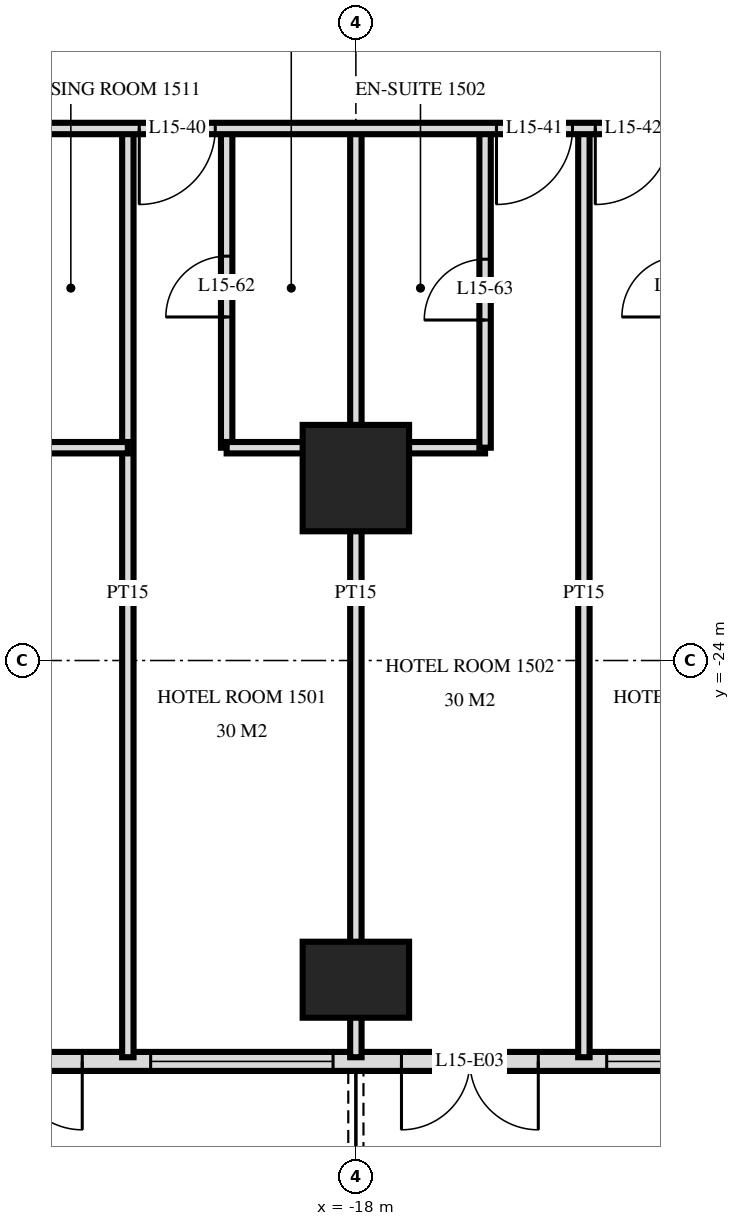
"""IFC4 building model, lengths in metres.
Left out: names, types, materials, properties, quantities, classifications, styles, units other than length and angle.
Written with IfcOpenShell. Run it as: python <this file> out.ifc"""

import sys

from ifc_helpers import new_model, si_unit, direction, frame, frame_2d, origin, origin_2d, place, context, subcontext, project, spatial, rectangle, extrude, element, fill, save


model = new_model("IFC4")
c1 = context("Model", 3, precision=1e-05, world=origin(), true_north=direction((0.0, 1.0)))
c2 = subcontext(c1, "Body", "Model", "MODEL_VIEW")
j1 = project(units=[si_unit("LENGTHUNIT", "METRE"), si_unit("PLANEANGLEUNIT", "RADIAN")], contexts=[c1])
p1 = place(None, origin())
s1 = spatial("IfcSite", under=j1, at=p1, CompositionType="ELEMENT")
p2 = place(p1, origin())
s2 = spatial("IfcBuilding", under=s1, at=p2, CompositionType="ELEMENT")
p3 = place(p2, frame((0.0, 0.0, 63.6)))
s3 = spatial("IfcBuildingStorey", under=s2, at=p3, CompositionType="ELEMENT", Elevation=63.6)
p4 = place(p3, frame((-18.0, -28.2, 0.0), z_axis=(0.0, 0.0, 1.0), x_axis=(1.0, 0.0, 0.0)))
e1 = element("IfcColumn", 1, at=p4, inside=s3, PredefinedType="COLUMN", context=c2, shape_type="SweptSolid", body=[
    extrude(rectangle(XDim=1.4, YDim=1.0, at=origin_2d()), origin(), (0.0, 0.0, 1.0), 3.6),
])
p5 = place(p3, frame((-18.0, -21.6, 0.0), z_axis=(0.0, 0.0, 1.0), x_axis=(1.0, 0.0, 0.0)))
e2 = element("IfcColumn", 2, at=p5, inside=s3, PredefinedType="COLUMN", context=c2, shape_type="SweptSolid", body=[
    extrude(rectangle(XDim=1.4, YDim=1.4, at=origin_2d()), origin(), (0.0, 0.0, 1.0), 3.6),
])
p6 = place(p3, frame((-28.775, -29.275, 0.0), z_axis=(0.0, 0.0, 1.0), x_axis=(1.0, 0.0, 0.0)))
e3 = element("IfcWall", 3, at=p6, inside=s3, PredefinedType="SOLIDWALL", context=c2, shape_type="SweptSolid", body=[
    extrude(rectangle(XDim=57.551, YDim=0.25, at=frame_2d((28.775, 0.0))), origin(), (0.0, 0.0, 1.0), 3.32),
])
p7 = place(p6, frame((0.575, 0.0, 0.0)))
e4 = element("IfcOpeningElement", 4, at=p7, cuts=e3, PredefinedType="OPENING", context=c2, shape_type="SweptSolid", body=[
    extrude(rectangle(XDim=1.8, YDim=2.4, at=frame_2d((0.9, 1.2))), frame((0.0, 0.135, 0.0), z_axis=(0.0, -1.0, 0.0), x_axis=(1.0, 0.0, 0.0)), (0.0, 0.0, 1.0), 0.27),
])
p8 = place(p6, frame((5.375, 0.0, 0.0)))
e5 = element("IfcOpeningElement", 5, at=p8, cuts=e3, PredefinedType="OPENING", context=c2, shape_type="SweptSolid", body=[
    extrude(rectangle(XDim=1.8, YDim=2.4, at=frame_2d((0.9, 1.2))), frame((0.0, 0.135, 0.0), z_axis=(0.0, -1.0, 0.0), x_axis=(1.0, 0.0, 0.0)), (0.0, 0.0, 1.0), 0.27),
])
p9 = place(p6, frame((8.075, 0.0, 0.3)))
e6 = element("IfcOpeningElement", 6, at=p9, cuts=e3, PredefinedType="OPENING", context=c2, shape_type="SweptSolid", body=[
    extrude(rectangle(XDim=2.4, YDim=2.1, at=frame_2d((1.2, 1.05))), frame((0.0, 0.135, 0.0), z_axis=(0.0, -1.0, 0.0), x_axis=(1.0, 0.0, 0.0)), (0.0, 0.0, 1.0), 0.27),
])
p10 = place(p6, frame((11.375, 0.0, 0.0)))
e7 = element("IfcOpeningElement", 7, at=p10, cuts=e3, PredefinedType="OPENING", context=c2, shape_type="SweptSolid", body=[
    extrude(rectangle(XDim=1.8, YDim=2.4, at=frame_2d((0.9, 1.2))), frame((0.0, 0.135, 0.0), z_axis=(0.0, -1.0, 0.0), x_axis=(1.0, 0.0, 0.0)), (0.0, 0.0, 1.0), 0.27),
])
p11 = place(p6, frame((14.075, 0.0, 0.3)))
e8 = element("IfcOpeningElement", 8, at=p11, cuts=e3, PredefinedType="OPENING", context=c2, shape_type="SweptSolid", body=[
    extrude(rectangle(XDim=2.4, YDim=2.1, at=frame_2d((1.2, 1.05))), frame((0.0, 0.135, 0.0), z_axis=(0.0, -1.0, 0.0), x_axis=(1.0, 0.0, 0.0)), (0.0, 0.0, 1.0), 0.27),
])
p12 = place(p6, frame((17.375, 0.0, 0.0)))
e9 = element("IfcOpeningElement", 9, at=p12, cuts=e3, PredefinedType="OPENING", context=c2, shape_type="SweptSolid", body=[
    extrude(rectangle(XDim=1.8, YDim=2.4, at=frame_2d((0.9, 1.2))), frame((0.0, 0.135, 0.0), z_axis=(0.0, -1.0, 0.0), x_axis=(1.0, 0.0, 0.0)), (0.0, 0.0, 1.0), 0.27),
])
p13 = place(p6, frame((20.075, 0.0, 0.3)))
e10 = element("IfcOpeningElement", 10, at=p13, cuts=e3, PredefinedType="OPENING", context=c2, shape_type="SweptSolid", body=[
    extrude(rectangle(XDim=2.4, YDim=2.1, at=frame_2d((1.2, 1.05))), frame((0.0, 0.135, 0.0), z_axis=(0.0, -1.0, 0.0), x_axis=(1.0, 0.0, 0.0)), (0.0, 0.0, 1.0), 0.27),
])
p14 = place(p6, frame((23.075, 0.0, 0.3)))
e11 = element("IfcOpeningElement", 11, at=p14, cuts=e3, PredefinedType="OPENING", context=c2, shape_type="SweptSolid", body=[
    extrude(rectangle(XDim=2.4, YDim=2.1, at=frame_2d((1.2, 1.05))), frame((0.0, 0.135, 0.0), z_axis=(0.0, -1.0, 0.0), x_axis=(1.0, 0.0, 0.0)), (0.0, 0.0, 1.0), 0.27),
])
p15 = place(p6, frame((26.375, 0.0, 0.0)))
e12 = element("IfcOpeningElement", 12, at=p15, cuts=e3, PredefinedType="OPENING", context=c2, shape_type="SweptSolid", body=[
    extrude(rectangle(XDim=1.8, YDim=2.4, at=frame_2d((0.9, 1.2))), frame((0.0, 0.135, 0.0), z_axis=(0.0, -1.0, 0.0), x_axis=(1.0, 0.0, 0.0)), (0.0, 0.0, 1.0), 0.27),
])
p16 = place(p6, frame((29.075, 0.0, 0.3)))
e13 = element("IfcOpeningElement", 13, at=p16, cuts=e3, PredefinedType="OPENING", context=c2, shape_type="SweptSolid", body=[
    extrude(rectangle(XDim=2.4, YDim=2.1, at=frame_2d((1.2, 1.05))), frame((0.0, 0.135, 0.0), z_axis=(0.0, -1.0, 0.0), x_axis=(1.0, 0.0, 0.0)), (0.0, 0.0, 1.0), 0.27),
])
p17 = place(p6, frame((32.375, 0.0, 0.0)))
e14 = element("IfcOpeningElement", 14, at=p17, cuts=e3, PredefinedType="OPENING", context=c2, shape_type="SweptSolid", body=[
    extrude(rectangle(XDim=1.8, YDim=2.4, at=frame_2d((0.9, 1.2))), frame((0.0, 0.135, 0.0), z_axis=(0.0, -1.0, 0.0), x_axis=(1.0, 0.0, 0.0)), (0.0, 0.0, 1.0), 0.27),
])
p18 = place(p6, frame((35.375, 0.0, 0.0)))
e15 = element("IfcOpeningElement", 15, at=p18, cuts=e3, PredefinedType="OPENING", context=c2, shape_type="SweptSolid", body=[
    extrude(rectangle(XDim=1.8, YDim=2.4, at=frame_2d((0.9, 1.2))), frame((0.0, 0.135, 0.0), z_axis=(0.0, -1.0, 0.0), x_axis=(1.0, 0.0, 0.0)), (0.0, 0.0, 1.0), 0.27),
])
p19 = place(p6, frame((38.075, 0.0, 0.3)))
e16 = element("IfcOpeningElement", 16, at=p19, cuts=e3, PredefinedType="OPENING", context=c2, shape_type="SweptSolid", body=[
    extrude(rectangle(XDim=2.4, YDim=2.1, at=frame_2d((1.2, 1.05))), frame((0.0, 0.135, 0.0), z_axis=(0.0, -1.0, 0.0), x_axis=(1.0, 0.0, 0.0)), (0.0, 0.0, 1.0), 0.27),
])
p20 = place(p6, frame((41.375, 0.0, 0.0)))
e17 = element("IfcOpeningElement", 17, at=p20, cuts=e3, PredefinedType="OPENING", context=c2, shape_type="SweptSolid", body=[
    extrude(rectangle(XDim=1.8, YDim=2.4, at=frame_2d((0.9, 1.2))), frame((0.0, 0.135, 0.0), z_axis=(0.0, -1.0, 0.0), x_axis=(1.0, 0.0, 0.0)), (0.0, 0.0, 1.0), 0.27),
])
p21 = place(p6, frame((44.075, 0.0, 0.3)))
e18 = element("IfcOpeningElement", 18, at=p21, cuts=e3, PredefinedType="OPENING", context=c2, shape_type="SweptSolid", body=[
    extrude(rectangle(XDim=2.4, YDim=2.1, at=frame_2d((1.2, 1.05))), frame((0.0, 0.135, 0.0), z_axis=(0.0, -1.0, 0.0), x_axis=(1.0, 0.0, 0.0)), (0.0, 0.0, 1.0), 0.27),
])
p22 = place(p6, frame((47.075, 0.0, 0.3)))
e19 = element("IfcOpeningElement", 19, at=p22, cuts=e3, PredefinedType="OPENING", context=c2, shape_type="SweptSolid", body=[
    extrude(rectangle(XDim=2.4, YDim=2.1, at=frame_2d((1.2, 1.05))), frame((0.0, 0.135, 0.0), z_axis=(0.0, -1.0, 0.0), x_axis=(1.0, 0.0, 0.0)), (0.0, 0.0, 1.0), 0.27),
])
p23 = place(p6, frame((50.375, 0.0, 0.0)))
e20 = element("IfcOpeningElement", 20, at=p23, cuts=e3, PredefinedType="OPENING", context=c2, shape_type="SweptSolid", body=[
    extrude(rectangle(XDim=1.8, YDim=2.4, at=frame_2d((0.9, 1.2))), frame((0.0, 0.135, 0.0), z_axis=(0.0, -1.0, 0.0), x_axis=(1.0, 0.0, 0.0)), (0.0, 0.0, 1.0), 0.27),
])
p24 = place(p6, frame((53.375, 0.0, 0.0)))
e21 = element("IfcOpeningElement", 21, at=p24, cuts=e3, PredefinedType="OPENING", context=c2, shape_type="SweptSolid", body=[
    extrude(rectangle(XDim=1.8, YDim=2.4, at=frame_2d((0.9, 1.2))), frame((0.0, 0.135, 0.0), z_axis=(0.0, -1.0, 0.0), x_axis=(1.0, 0.0, 0.0)), (0.0, 0.0, 1.0), 0.27),
])
p25 = place(p3, frame((-15.0, -29.22, 0.0), z_axis=(0.0, 0.0, 1.0), x_axis=(0.0, 1.0, 0.0)))
e22 = element("IfcWall", 22, at=p25, inside=s3, PredefinedType="PARTITIONING", context=c2, shape_type="SweptSolid", body=[
    extrude(rectangle(XDim=12.22, YDim=0.15, at=frame_2d((6.11, 0.0))), origin(), (0.0, 0.0, 1.0), 3.32),
])
p26 = place(p3, frame((-16.3, -21.2, 0.0), z_axis=(0.0, 0.0, 1.0), x_axis=(0.0, 1.0, 0.0)))
e23 = element("IfcWall", 23, at=p26, inside=s3, PredefinedType="PARTITIONING", context=c2, shape_type="SweptSolid", body=[
    extrude(rectangle(XDim=4.2, YDim=0.15, at=frame_2d((2.1, 0.0))), origin(), (0.0, 0.0, 1.0), 3.32),
])
p27 = place(p26, frame((1.68, 0.0, 0.0)))
e24 = element("IfcOpeningElement", 24, at=p27, cuts=e23, PredefinedType="OPENING", context=c2, shape_type="SweptSolid", body=[
    extrude(rectangle(XDim=0.8, YDim=2.1, at=frame_2d((0.4, 1.05))), frame((0.0, 0.085, 0.0), z_axis=(0.0, -1.0, 0.0), x_axis=(1.0, 0.0, 0.0)), (0.0, 0.0, 1.0), 0.17),
])
p28 = place(p3, frame((-18.0, -29.22, 0.0), z_axis=(0.0, 0.0, 1.0), x_axis=(0.0, 1.0, 0.0)))
e25 = element("IfcWall", 25, at=p28, inside=s3, PredefinedType="PARTITIONING", context=c2, shape_type="SweptSolid", body=[
    extrude(rectangle(XDim=12.22, YDim=0.15, at=frame_2d((6.11, 0.0))), origin(), (0.0, 0.0, 1.0), 3.32),
])
p29 = place(p3, frame((-19.7, -21.2, 0.0), z_axis=(0.0, 0.0, 1.0), x_axis=(0.0, 1.0, 0.0)))
e26 = element("IfcWall", 26, at=p29, inside=s3, PredefinedType="PARTITIONING", context=c2, shape_type="SweptSolid", body=[
    extrude(rectangle(XDim=4.2, YDim=0.15, at=frame_2d((2.1, 0.0))), origin(), (0.0, 0.0, 1.0), 3.32),
])
p30 = place(p29, frame((1.72, 0.0, 0.0)))
e27 = element("IfcOpeningElement", 27, at=p30, cuts=e26, PredefinedType="OPENING", context=c2, shape_type="SweptSolid", body=[
    extrude(rectangle(XDim=0.8, YDim=2.1, at=frame_2d((0.4, 1.05))), frame((0.0, 0.085, 0.0), z_axis=(0.0, -1.0, 0.0), x_axis=(1.0, 0.0, 0.0)), (0.0, 0.0, 1.0), 0.17),
])
p31 = place(p3, frame((-21.0, -29.22, 0.0), z_axis=(0.0, 0.0, 1.0), x_axis=(0.0, 1.0, 0.0)))
e28 = element("IfcWall", 28, at=p31, inside=s3, PredefinedType="PARTITIONING", context=c2, shape_type="SweptSolid", body=[
    extrude(rectangle(XDim=12.22, YDim=0.15, at=frame_2d((6.11, 0.0))), origin(), (0.0, 0.0, 1.0), 3.32),
])
p32 = place(p3, frame((-22.5, -21.2, 0.0), z_axis=(0.0, 0.0, 1.0), x_axis=(1.0, 0.0, 0.0)))
e29 = element("IfcWall", 29, at=p32, inside=s3, PredefinedType="PARTITIONING", context=c2, shape_type="SweptSolid", body=[
    extrude(rectangle(XDim=1.5, YDim=0.15, at=frame_2d((0.75, 0.0))), origin(), (0.0, 0.0, 1.0), 3.32),
])
p33 = place(p3, frame((-19.7, -21.2, 0.0), z_axis=(0.0, 0.0, 1.0), x_axis=(1.0, 0.0, 0.0)))
e30 = element("IfcWall", 30, at=p33, inside=s3, PredefinedType="PARTITIONING", context=c2, shape_type="SweptSolid", body=[
    extrude(rectangle(XDim=3.4, YDim=0.15, at=frame_2d((1.7, 0.0))), origin(), (0.0, 0.0, 1.0), 3.32),
])
p34 = place(p3, frame((-33.12, -17.0, 0.0), z_axis=(0.0, 0.0, 1.0), x_axis=(1.0, 0.0, 0.0)))
e31 = element("IfcWall", 31, at=p34, inside=s3, PredefinedType="PARTITIONING", context=c2, shape_type="SweptSolid", body=[
    extrude(rectangle(XDim=66.24, YDim=0.15, at=frame_2d((33.12, 0.0))), origin(), (0.0, 0.0, 1.0), 3.32),
])
p35 = place(p34, frame((12.27, 0.0, 0.0)))
e32 = element("IfcOpeningElement", 32, at=p35, cuts=e31, PredefinedType="OPENING", context=c2, shape_type="SweptSolid", body=[
    extrude(rectangle(XDim=1.0, YDim=2.1, at=frame_2d((0.5, 1.05))), frame((0.0, 0.085, 0.0), z_axis=(0.0, -1.0, 0.0), x_axis=(1.0, 0.0, 0.0)), (0.0, 0.0, 1.0), 0.17),
])
p36 = place(p34, frame((16.97, 0.0, 0.0)))
e33 = element("IfcOpeningElement", 33, at=p36, cuts=e31, PredefinedType="OPENING", context=c2, shape_type="SweptSolid", body=[
    extrude(rectangle(XDim=1.0, YDim=2.1, at=frame_2d((0.5, 1.05))), frame((0.0, 0.085, 0.0), z_axis=(0.0, -1.0, 0.0), x_axis=(1.0, 0.0, 0.0)), (0.0, 0.0, 1.0), 0.17),
])
p37 = place(p34, frame((18.27, 0.0, 0.0)))
e34 = element("IfcOpeningElement", 34, at=p37, cuts=e31, PredefinedType="OPENING", context=c2, shape_type="SweptSolid", body=[
    extrude(rectangle(XDim=1.0, YDim=2.1, at=frame_2d((0.5, 1.05))), frame((0.0, 0.085, 0.0), z_axis=(0.0, -1.0, 0.0), x_axis=(1.0, 0.0, 0.0)), (0.0, 0.0, 1.0), 0.17),
])
p38 = place(p34, frame((22.97, 0.0, 0.0)))
e35 = element("IfcOpeningElement", 35, at=p38, cuts=e31, PredefinedType="OPENING", context=c2, shape_type="SweptSolid", body=[
    extrude(rectangle(XDim=1.0, YDim=2.1, at=frame_2d((0.5, 1.05))), frame((0.0, 0.085, 0.0), z_axis=(0.0, -1.0, 0.0), x_axis=(1.0, 0.0, 0.0)), (0.0, 0.0, 1.0), 0.17),
])
p39 = place(p34, frame((24.27, 0.0, 0.0)))
e36 = element("IfcOpeningElement", 36, at=p39, cuts=e31, PredefinedType="OPENING", context=c2, shape_type="SweptSolid", body=[
    extrude(rectangle(XDim=1.0, YDim=2.1, at=frame_2d((0.5, 1.05))), frame((0.0, 0.085, 0.0), z_axis=(0.0, -1.0, 0.0), x_axis=(1.0, 0.0, 0.0)), (0.0, 0.0, 1.0), 0.17),
])
p40 = place(p34, frame((28.97, 0.0, 0.0)))
e37 = element("IfcOpeningElement", 37, at=p40, cuts=e31, PredefinedType="OPENING", context=c2, shape_type="SweptSolid", body=[
    extrude(rectangle(XDim=1.0, YDim=2.1, at=frame_2d((0.5, 1.05))), frame((0.0, 0.085, 0.0), z_axis=(0.0, -1.0, 0.0), x_axis=(1.0, 0.0, 0.0)), (0.0, 0.0, 1.0), 0.17),
])
p41 = place(p34, frame((30.27, 0.0, 0.0)))
e38 = element("IfcOpeningElement", 38, at=p41, cuts=e31, PredefinedType="OPENING", context=c2, shape_type="SweptSolid", body=[
    extrude(rectangle(XDim=1.0, YDim=2.1, at=frame_2d((0.5, 1.05))), frame((0.0, 0.085, 0.0), z_axis=(0.0, -1.0, 0.0), x_axis=(1.0, 0.0, 0.0)), (0.0, 0.0, 1.0), 0.17),
])
p42 = place(p34, frame((33.82, 0.0, 0.0)))
e39 = element("IfcOpeningElement", 39, at=p42, cuts=e31, PredefinedType="OPENING", context=c2, shape_type="SweptSolid", body=[
    extrude(rectangle(XDim=1.0, YDim=2.1, at=frame_2d((0.5, 1.05))), frame((0.0, 0.085, 0.0), z_axis=(0.0, -1.0, 0.0), x_axis=(1.0, 0.0, 0.0)), (0.0, 0.0, 1.0), 0.17),
])
p43 = place(p34, frame((46.27, 0.0, 0.0)))
e40 = element("IfcOpeningElement", 40, at=p43, cuts=e31, PredefinedType="OPENING", context=c2, shape_type="SweptSolid", body=[
    extrude(rectangle(XDim=1.0, YDim=2.1, at=frame_2d((0.5, 1.05))), frame((0.0, 0.085, 0.0), z_axis=(0.0, -1.0, 0.0), x_axis=(1.0, 0.0, 0.0)), (0.0, 0.0, 1.0), 0.17),
])
p44 = place(p34, frame((52.97, 0.0, 0.0)))
e41 = element("IfcOpeningElement", 41, at=p44, cuts=e31, PredefinedType="OPENING", context=c2, shape_type="SweptSolid", body=[
    extrude(rectangle(XDim=1.0, YDim=2.1, at=frame_2d((0.5, 1.05))), frame((0.0, 0.085, 0.0), z_axis=(0.0, -1.0, 0.0), x_axis=(1.0, 0.0, 0.0)), (0.0, 0.0, 1.0), 0.17),
])
p45 = place(p34, frame((6.05, 0.0, 0.0)))
e42 = element("IfcOpeningElement", 42, at=p45, cuts=e31, PredefinedType="OPENING", context=c2, shape_type="SweptSolid", body=[
    extrude(rectangle(XDim=1.0, YDim=2.1, at=frame_2d((0.5, 1.05))), frame((0.0, 0.085, 0.0), z_axis=(0.0, -1.0, 0.0), x_axis=(1.0, 0.0, 0.0)), (0.0, 0.0, 1.0), 0.17),
])
p46 = place(p34, frame((59.15, 0.0, 0.0)))
e43 = element("IfcOpeningElement", 43, at=p46, cuts=e31, PredefinedType="OPENING", context=c2, shape_type="SweptSolid", body=[
    extrude(rectangle(XDim=1.0, YDim=2.1, at=frame_2d((0.5, 1.05))), frame((0.0, 0.085, 0.0), z_axis=(0.0, -1.0, 0.0), x_axis=(1.0, 0.0, 0.0)), (0.0, 0.0, 1.0), 0.17),
])
p47 = place(p8, frame((0.9, 0.0, 0.0), z_axis=(0.0, 0.0, 1.0), x_axis=(-1.0, 0.0, 0.0)))
e44 = element("IfcDoor", 44, at=p47, inside=s3, OperationType="DOUBLE_DOOR_SINGLE_SWING", PredefinedType="DOOR", context=c2, shape_type="SweptSolid", body=[
    extrude(rectangle(XDim=1.8, YDim=2.4, at=frame_2d((0.0, 1.2))), frame((0.0, -0.025, 0.0), z_axis=(0.0, 1.0, 0.0), x_axis=(-1.0, 0.0, 0.0)), (0.0, 0.0, 1.0), 0.05),
])
fill(e5, e44)
p48 = place(p9, origin())
e45 = element("IfcWindow", 45, at=p48, inside=s3, PartitioningType="SINGLE_PANEL", PredefinedType="WINDOW", context=c2, shape_type="SweptSolid", body=[
    extrude(rectangle(XDim=2.4, YDim=2.1, at=frame_2d((1.2, 1.05))), frame((0.0, 0.03, 0.0), z_axis=(0.0, -1.0, 0.0), x_axis=(1.0, 0.0, 0.0)), (0.0, 0.0, 1.0), 0.06),
])
fill(e6, e45)
p49 = place(p10, frame((0.9, 0.0, 0.0), z_axis=(0.0, 0.0, 1.0), x_axis=(-1.0, 0.0, 0.0)))
e46 = element("IfcDoor", 46, at=p49, inside=s3, OperationType="DOUBLE_DOOR_SINGLE_SWING", PredefinedType="DOOR", context=c2, shape_type="SweptSolid", body=[
    extrude(rectangle(XDim=1.8, YDim=2.4, at=frame_2d((0.0, 1.2))), frame((0.0, -0.025, 0.0), z_axis=(0.0, 1.0, 0.0), x_axis=(-1.0, 0.0, 0.0)), (0.0, 0.0, 1.0), 0.05),
])
fill(e7, e46)
p50 = place(p11, origin())
e47 = element("IfcWindow", 47, at=p50, inside=s3, PartitioningType="SINGLE_PANEL", PredefinedType="WINDOW", context=c2, shape_type="SweptSolid", body=[
    extrude(rectangle(XDim=2.4, YDim=2.1, at=frame_2d((1.2, 1.05))), frame((0.0, 0.03, 0.0), z_axis=(0.0, -1.0, 0.0), x_axis=(1.0, 0.0, 0.0)), (0.0, 0.0, 1.0), 0.06),
])
fill(e8, e47)
p51 = place(p35, frame((0.5, 0.0, 0.0), z_axis=(0.0, 0.0, 1.0), x_axis=(-1.0, 0.0, 0.0)))
e48 = element("IfcDoor", 48, at=p51, inside=s3, OperationType="SINGLE_SWING_LEFT", PredefinedType="DOOR", context=c2, shape_type="SweptSolid", body=[
    extrude(rectangle(XDim=1.0, YDim=2.1, at=frame_2d((0.0, 1.05))), frame((0.0, -0.025, 0.0), z_axis=(0.0, 1.0, 0.0), x_axis=(-1.0, 0.0, 0.0)), (0.0, 0.0, 1.0), 0.05),
])
fill(e32, e48)
p52 = place(p36, frame((0.5, 0.0, 0.0), z_axis=(0.0, 0.0, 1.0), x_axis=(-1.0, 0.0, 0.0)))
e49 = element("IfcDoor", 49, at=p52, inside=s3, OperationType="SINGLE_SWING_LEFT", PredefinedType="DOOR", context=c2, shape_type="SweptSolid", body=[
    extrude(rectangle(XDim=1.0, YDim=2.1, at=frame_2d((0.0, 1.05))), frame((0.0, -0.025, 0.0), z_axis=(0.0, 1.0, 0.0), x_axis=(-1.0, 0.0, 0.0)), (0.0, 0.0, 1.0), 0.05),
])
fill(e33, e49)
p53 = place(p37, frame((0.5, 0.0, 0.0), z_axis=(0.0, 0.0, 1.0), x_axis=(-1.0, 0.0, 0.0)))
e50 = element("IfcDoor", 50, at=p53, inside=s3, OperationType="SINGLE_SWING_LEFT", PredefinedType="DOOR", context=c2, shape_type="SweptSolid", body=[
    extrude(rectangle(XDim=1.0, YDim=2.1, at=frame_2d((0.0, 1.05))), frame((0.0, -0.025, 0.0), z_axis=(0.0, 1.0, 0.0), x_axis=(-1.0, 0.0, 0.0)), (0.0, 0.0, 1.0), 0.05),
])
fill(e34, e50)
p54 = place(p30, origin())
e51 = element("IfcDoor", 51, at=p54, inside=s3, OperationType="SINGLE_SWING_RIGHT", PredefinedType="DOOR", context=c2, shape_type="SweptSolid", body=[
    extrude(rectangle(XDim=0.8, YDim=2.1, at=frame_2d((0.4, 1.05))), frame((0.0, 0.025, 0.0), z_axis=(0.0, -1.0, 0.0), x_axis=(1.0, 0.0, 0.0)), (0.0, 0.0, 1.0), 0.05),
])
fill(e27, e51)
p55 = place(p27, origin())
e52 = element("IfcDoor", 52, at=p55, inside=s3, OperationType="SINGLE_SWING_RIGHT", PredefinedType="DOOR", context=c2, shape_type="SweptSolid", body=[
    extrude(rectangle(XDim=0.8, YDim=2.1, at=frame_2d((0.4, 1.05))), frame((0.0, 0.025, 0.0), z_axis=(0.0, -1.0, 0.0), x_axis=(1.0, 0.0, 0.0)), (0.0, 0.0, 1.0), 0.05),
])
fill(e24, e52)
save(model, sys.argv[1])
